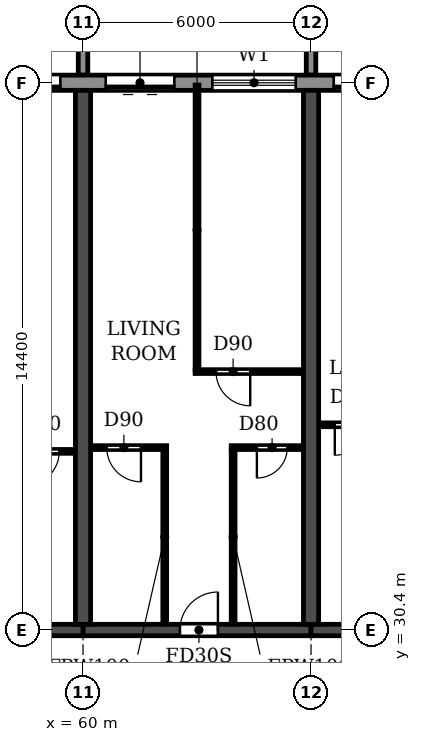
"""IFC4 building model, lengths in metres.
Left out: names, types, materials, properties, quantities, classifications, styles, units other than length and angle.
Written with IfcOpenShell. Run it as: python <this file> out.ifc"""

import sys

from ifc_helpers import new_model, si_unit, direction, frame, frame_2d, origin, place, context, subcontext, project, spatial, polyline, rectangle, outline, extrude, source, transform, mapped, element, fill, save


model = new_model("IFC4")
c1 = context("Model", 3, precision=1e-05, world=origin(), true_north=direction((0.0, 1.0)))
c2 = subcontext(c1, "Body", "Model", "MODEL_VIEW")
j1 = project(units=[si_unit("LENGTHUNIT", "METRE"), si_unit("PLANEANGLEUNIT", "RADIAN")], contexts=[c1])
p1 = place(None, origin())
s1 = spatial("IfcSite", under=j1, at=p1, CompositionType="ELEMENT")
p2 = place(p1, origin())
s2 = spatial("IfcBuilding", under=s1, at=p2, CompositionType="ELEMENT")
p3 = place(p2, frame((0.0, 0.0, 63.0)))
s3 = spatial("IfcBuildingStorey", under=s2, at=p3, CompositionType="ELEMENT", Elevation=63.0)
for number, where, z_axis, x_axis in (
    (1, (60.0, 30.55, 0.0), (0.0, 0.0, 1.0), (0.0, 1.0, 0.0)),
    (2, (66.0, 30.55, 0.0), (0.0, 0.0, 1.0), (0.0, 1.0, 0.0)),
):
    element("IfcWall", number, at=place(p3, frame(where, z_axis=z_axis, x_axis=x_axis)), inside=s3, PredefinedType="SHEAR", context=c2, shape_type="SweptSolid", body=[
        extrude(rectangle(XDim=14.05, YDim=0.4, at=frame_2d((7.025, 0.0))), origin(), (0.0, 0.0, 1.0), 2.95),
    ])
p4 = place(p3, frame((54.0, 30.4, 0.0), z_axis=(0.0, 0.0, 1.0), x_axis=(1.0, 0.0, 0.0)))
e3 = element("IfcWall", 3, at=p4, inside=s3, PredefinedType="SHEAR", context=c2, shape_type="SweptSolid", body=[
    extrude(rectangle(XDim=6.0, YDim=0.3, at=frame_2d((3.0, 0.0))), origin(), (0.0, 0.0, 1.0), 2.35),
])
p5 = place(p4, frame((2.45, 0.0, 0.0)))
e4 = element("IfcOpeningElement", 4, at=p5, cuts=e3, PredefinedType="OPENING", context=c2, shape_type="SweptSolid", body=[
    extrude(rectangle(XDim=1.0, YDim=2.1, at=frame_2d((0.5, 1.05))), frame((0.0, 0.16, 0.0), z_axis=(0.0, -1.0, 0.0), x_axis=(1.0, 0.0, 0.0)), (0.0, 0.0, 1.0), 0.32),
])
p6 = place(p3, frame((60.0, 30.4, 0.0), z_axis=(0.0, 0.0, 1.0), x_axis=(1.0, 0.0, 0.0)))
e5 = element("IfcWall", 5, at=p6, inside=s3, PredefinedType="SHEAR", context=c2, shape_type="SweptSolid", body=[
    extrude(rectangle(XDim=6.0, YDim=0.3, at=frame_2d((3.0, 0.0))), origin(), (0.0, 0.0, 1.0), 2.35),
])
p7 = place(p6, frame((2.55, 0.0, 0.0)))
e6 = element("IfcOpeningElement", 6, at=p7, cuts=e5, PredefinedType="OPENING", context=c2, shape_type="SweptSolid", body=[
    extrude(rectangle(XDim=1.0, YDim=2.1, at=frame_2d((0.5, 1.05))), frame((0.0, 0.16, 0.0), z_axis=(0.0, -1.0, 0.0), x_axis=(1.0, 0.0, 0.0)), (0.0, 0.0, 1.0), 0.32),
])
p8 = place(p3, frame((66.0, 30.4, 0.0), z_axis=(0.0, 0.0, 1.0), x_axis=(1.0, 0.0, 0.0)))
e7 = element("IfcWall", 7, at=p8, inside=s3, PredefinedType="SHEAR", context=c2, shape_type="SweptSolid", body=[
    extrude(rectangle(XDim=6.0, YDim=0.3, at=frame_2d((3.0, 0.0))), origin(), (0.0, 0.0, 1.0), 2.35),
])
p9 = place(p8, frame((2.45, 0.0, 0.0)))
e8 = element("IfcOpeningElement", 8, at=p9, cuts=e7, PredefinedType="OPENING", context=c2, shape_type="SweptSolid", body=[
    extrude(rectangle(XDim=1.0, YDim=2.1, at=frame_2d((0.5, 1.05))), frame((0.0, 0.16, 0.0), z_axis=(0.0, -1.0, 0.0), x_axis=(1.0, 0.0, 0.0)), (0.0, 0.0, 1.0), 0.32),
])
p10 = place(p3, frame((91.317, 44.8, 0.0), z_axis=(0.0, 0.0, 1.0), x_axis=(-1.0, 0.0, 0.0)))
e9 = element("IfcWall", 9, at=p10, inside=s3, PredefinedType="STANDARD", context=c2, shape_type="SweptSolid", body=[
    extrude(rectangle(XDim=80.634, YDim=0.4, at=frame_2d((40.317, 0.0))), origin(), (0.0, 0.0, 1.0), 2.95),
])
p11 = place(p10, frame((76.717, 0.0, 0.9)))
e10 = element("IfcOpeningElement", 10, at=p11, cuts=e9, PredefinedType="OPENING", context=c2, shape_type="SweptSolid", body=[
    extrude(rectangle(XDim=2.2, YDim=1.5, at=frame_2d((1.1, 0.75))), frame((0.0, 0.21, 0.0), z_axis=(0.0, -1.0, 0.0), x_axis=(1.0, 0.0, 0.0)), (0.0, 0.0, 1.0), 0.42),
])
p12 = place(p10, frame((73.917, 0.0, 0.0)))
e11 = element("IfcOpeningElement", 11, at=p12, cuts=e9, PredefinedType="OPENING", context=c2, shape_type="SweptSolid", body=[
    extrude(rectangle(XDim=1.8, YDim=2.4, at=frame_2d((0.9, 1.2))), frame((0.0, 0.21, 0.0), z_axis=(0.0, -1.0, 0.0), x_axis=(1.0, 0.0, 0.0)), (0.0, 0.0, 1.0), 0.42),
])
p13 = place(p10, frame((70.717, 0.0, 0.9)))
e12 = element("IfcOpeningElement", 12, at=p13, cuts=e9, PredefinedType="OPENING", context=c2, shape_type="SweptSolid", body=[
    extrude(rectangle(XDim=2.2, YDim=1.5, at=frame_2d((1.1, 0.75))), frame((0.0, 0.21, 0.0), z_axis=(0.0, -1.0, 0.0), x_axis=(1.0, 0.0, 0.0)), (0.0, 0.0, 1.0), 0.42),
])
p14 = place(p10, frame((67.917, 0.0, 0.0)))
e13 = element("IfcOpeningElement", 13, at=p14, cuts=e9, PredefinedType="OPENING", context=c2, shape_type="SweptSolid", body=[
    extrude(rectangle(XDim=1.8, YDim=2.4, at=frame_2d((0.9, 1.2))), frame((0.0, 0.21, 0.0), z_axis=(0.0, -1.0, 0.0), x_axis=(1.0, 0.0, 0.0)), (0.0, 0.0, 1.0), 0.42),
])
p15 = place(p10, frame((64.717, 0.0, 0.9)))
e14 = element("IfcOpeningElement", 14, at=p15, cuts=e9, PredefinedType="OPENING", context=c2, shape_type="SweptSolid", body=[
    extrude(rectangle(XDim=2.2, YDim=1.5, at=frame_2d((1.1, 0.75))), frame((0.0, 0.21, 0.0), z_axis=(0.0, -1.0, 0.0), x_axis=(1.0, 0.0, 0.0)), (0.0, 0.0, 1.0), 0.42),
])
p16 = place(p10, frame((61.917, 0.0, 0.0)))
e15 = element("IfcOpeningElement", 15, at=p16, cuts=e9, PredefinedType="OPENING", context=c2, shape_type="SweptSolid", body=[
    extrude(rectangle(XDim=1.8, YDim=2.4, at=frame_2d((0.9, 1.2))), frame((0.0, 0.21, 0.0), z_axis=(0.0, -1.0, 0.0), x_axis=(1.0, 0.0, 0.0)), (0.0, 0.0, 1.0), 0.42),
])
p17 = place(p10, frame((58.717, 0.0, 0.9)))
e16 = element("IfcOpeningElement", 16, at=p17, cuts=e9, PredefinedType="OPENING", context=c2, shape_type="SweptSolid", body=[
    extrude(rectangle(XDim=2.2, YDim=1.5, at=frame_2d((1.1, 0.75))), frame((0.0, 0.21, 0.0), z_axis=(0.0, -1.0, 0.0), x_axis=(1.0, 0.0, 0.0)), (0.0, 0.0, 1.0), 0.42),
])
p18 = place(p10, frame((55.717, 0.0, 0.9)))
e17 = element("IfcOpeningElement", 17, at=p18, cuts=e9, PredefinedType="OPENING", context=c2, shape_type="SweptSolid", body=[
    extrude(rectangle(XDim=2.2, YDim=1.5, at=frame_2d((1.1, 0.75))), frame((0.0, 0.21, 0.0), z_axis=(0.0, -1.0, 0.0), x_axis=(1.0, 0.0, 0.0)), (0.0, 0.0, 1.0), 0.42),
])
p19 = place(p10, frame((52.917, 0.0, 0.0)))
e18 = element("IfcOpeningElement", 18, at=p19, cuts=e9, PredefinedType="OPENING", context=c2, shape_type="SweptSolid", body=[
    extrude(rectangle(XDim=1.8, YDim=2.4, at=frame_2d((0.9, 1.2))), frame((0.0, 0.21, 0.0), z_axis=(0.0, -1.0, 0.0), x_axis=(1.0, 0.0, 0.0)), (0.0, 0.0, 1.0), 0.42),
])
p20 = place(p10, frame((49.717, 0.0, 0.9)))
e19 = element("IfcOpeningElement", 19, at=p20, cuts=e9, PredefinedType="OPENING", context=c2, shape_type="SweptSolid", body=[
    extrude(rectangle(XDim=2.2, YDim=1.5, at=frame_2d((1.1, 0.75))), frame((0.0, 0.21, 0.0), z_axis=(0.0, -1.0, 0.0), x_axis=(1.0, 0.0, 0.0)), (0.0, 0.0, 1.0), 0.42),
])
p21 = place(p10, frame((46.917, 0.0, 0.0)))
e20 = element("IfcOpeningElement", 20, at=p21, cuts=e9, PredefinedType="OPENING", context=c2, shape_type="SweptSolid", body=[
    extrude(rectangle(XDim=1.8, YDim=2.4, at=frame_2d((0.9, 1.2))), frame((0.0, 0.21, 0.0), z_axis=(0.0, -1.0, 0.0), x_axis=(1.0, 0.0, 0.0)), (0.0, 0.0, 1.0), 0.42),
])
p22 = place(p10, frame((43.717, 0.0, 0.9)))
e21 = element("IfcOpeningElement", 21, at=p22, cuts=e9, PredefinedType="OPENING", context=c2, shape_type="SweptSolid", body=[
    extrude(rectangle(XDim=2.2, YDim=1.5, at=frame_2d((1.1, 0.75))), frame((0.0, 0.21, 0.0), z_axis=(0.0, -1.0, 0.0), x_axis=(1.0, 0.0, 0.0)), (0.0, 0.0, 1.0), 0.42),
])
p23 = place(p10, frame((40.717, 0.0, 0.9)))
e22 = element("IfcOpeningElement", 22, at=p23, cuts=e9, PredefinedType="OPENING", context=c2, shape_type="SweptSolid", body=[
    extrude(rectangle(XDim=2.2, YDim=1.5, at=frame_2d((1.1, 0.75))), frame((0.0, 0.21, 0.0), z_axis=(0.0, -1.0, 0.0), x_axis=(1.0, 0.0, 0.0)), (0.0, 0.0, 1.0), 0.42),
])
p24 = place(p10, frame((37.717, 0.0, 0.9)))
e23 = element("IfcOpeningElement", 23, at=p24, cuts=e9, PredefinedType="OPENING", context=c2, shape_type="SweptSolid", body=[
    extrude(rectangle(XDim=2.2, YDim=1.5, at=frame_2d((1.1, 0.75))), frame((0.0, 0.21, 0.0), z_axis=(0.0, -1.0, 0.0), x_axis=(1.0, 0.0, 0.0)), (0.0, 0.0, 1.0), 0.42),
])
p25 = place(p10, frame((34.717, 0.0, 0.9)))
e24 = element("IfcOpeningElement", 24, at=p25, cuts=e9, PredefinedType="OPENING", context=c2, shape_type="SweptSolid", body=[
    extrude(rectangle(XDim=2.2, YDim=1.5, at=frame_2d((1.1, 0.75))), frame((0.0, 0.21, 0.0), z_axis=(0.0, -1.0, 0.0), x_axis=(1.0, 0.0, 0.0)), (0.0, 0.0, 1.0), 0.42),
])
p26 = place(p10, frame((31.917, 0.0, 0.0)))
e25 = element("IfcOpeningElement", 25, at=p26, cuts=e9, PredefinedType="OPENING", context=c2, shape_type="SweptSolid", body=[
    extrude(rectangle(XDim=1.8, YDim=2.4, at=frame_2d((0.9, 1.2))), frame((0.0, 0.21, 0.0), z_axis=(0.0, -1.0, 0.0), x_axis=(1.0, 0.0, 0.0)), (0.0, 0.0, 1.0), 0.42),
])
p27 = place(p10, frame((28.917, 0.0, 0.0)))
e26 = element("IfcOpeningElement", 26, at=p27, cuts=e9, PredefinedType="OPENING", context=c2, shape_type="SweptSolid", body=[
    extrude(rectangle(XDim=1.8, YDim=2.4, at=frame_2d((0.9, 1.2))), frame((0.0, 0.21, 0.0), z_axis=(0.0, -1.0, 0.0), x_axis=(1.0, 0.0, 0.0)), (0.0, 0.0, 1.0), 0.42),
])
p28 = place(p10, frame((25.717, 0.0, 0.9)))
e27 = element("IfcOpeningElement", 27, at=p28, cuts=e9, PredefinedType="OPENING", context=c2, shape_type="SweptSolid", body=[
    extrude(rectangle(XDim=2.2, YDim=1.5, at=frame_2d((1.1, 0.75))), frame((0.0, 0.21, 0.0), z_axis=(0.0, -1.0, 0.0), x_axis=(1.0, 0.0, 0.0)), (0.0, 0.0, 1.0), 0.42),
])
p29 = place(p10, frame((22.917, 0.0, 0.0)))
e28 = element("IfcOpeningElement", 28, at=p29, cuts=e9, PredefinedType="OPENING", context=c2, shape_type="SweptSolid", body=[
    extrude(rectangle(XDim=1.8, YDim=2.4, at=frame_2d((0.9, 1.2))), frame((0.0, 0.21, 0.0), z_axis=(0.0, -1.0, 0.0), x_axis=(1.0, 0.0, 0.0)), (0.0, 0.0, 1.0), 0.42),
])
p30 = place(p10, frame((19.717, 0.0, 0.9)))
e29 = element("IfcOpeningElement", 29, at=p30, cuts=e9, PredefinedType="OPENING", context=c2, shape_type="SweptSolid", body=[
    extrude(rectangle(XDim=2.2, YDim=1.5, at=frame_2d((1.1, 0.75))), frame((0.0, 0.21, 0.0), z_axis=(0.0, -1.0, 0.0), x_axis=(1.0, 0.0, 0.0)), (0.0, 0.0, 1.0), 0.42),
])
p31 = place(p10, frame((16.917, 0.0, 0.0)))
e30 = element("IfcOpeningElement", 30, at=p31, cuts=e9, PredefinedType="OPENING", context=c2, shape_type="SweptSolid", body=[
    extrude(rectangle(XDim=1.8, YDim=2.4, at=frame_2d((0.9, 1.2))), frame((0.0, 0.21, 0.0), z_axis=(0.0, -1.0, 0.0), x_axis=(1.0, 0.0, 0.0)), (0.0, 0.0, 1.0), 0.42),
])
p32 = place(p10, frame((13.717, 0.0, 0.9)))
e31 = element("IfcOpeningElement", 31, at=p32, cuts=e9, PredefinedType="OPENING", context=c2, shape_type="SweptSolid", body=[
    extrude(rectangle(XDim=2.2, YDim=1.5, at=frame_2d((1.1, 0.75))), frame((0.0, 0.21, 0.0), z_axis=(0.0, -1.0, 0.0), x_axis=(1.0, 0.0, 0.0)), (0.0, 0.0, 1.0), 0.42),
])
p33 = place(p10, frame((10.917, 0.0, 0.0)))
e32 = element("IfcOpeningElement", 32, at=p33, cuts=e9, PredefinedType="OPENING", context=c2, shape_type="SweptSolid", body=[
    extrude(rectangle(XDim=1.8, YDim=2.4, at=frame_2d((0.9, 1.2))), frame((0.0, 0.21, 0.0), z_axis=(0.0, -1.0, 0.0), x_axis=(1.0, 0.0, 0.0)), (0.0, 0.0, 1.0), 0.42),
])
p34 = place(p10, frame((7.717, 0.0, 0.9)))
e33 = element("IfcOpeningElement", 33, at=p34, cuts=e9, PredefinedType="OPENING", context=c2, shape_type="SweptSolid", body=[
    extrude(rectangle(XDim=2.2, YDim=1.5, at=frame_2d((1.1, 0.75))), frame((0.0, 0.21, 0.0), z_axis=(0.0, -1.0, 0.0), x_axis=(1.0, 0.0, 0.0)), (0.0, 0.0, 1.0), 0.42),
])
p35 = place(p10, frame((4.717, 0.0, 0.9)))
e34 = element("IfcOpeningElement", 34, at=p35, cuts=e9, PredefinedType="OPENING", context=c2, shape_type="SweptSolid", body=[
    extrude(rectangle(XDim=2.2, YDim=1.5, at=frame_2d((1.1, 0.75))), frame((0.0, 0.21, 0.0), z_axis=(0.0, -1.0, 0.0), x_axis=(1.0, 0.0, 0.0)), (0.0, 0.0, 1.0), 0.42),
])
p36 = place(p10, frame((1.717, 0.0, 0.9)))
e35 = element("IfcOpeningElement", 35, at=p36, cuts=e9, PredefinedType="OPENING", context=c2, shape_type="SweptSolid", body=[
    extrude(rectangle(XDim=2.2, YDim=1.5, at=frame_2d((1.1, 0.75))), frame((0.0, 0.21, 0.0), z_axis=(0.0, -1.0, 0.0), x_axis=(1.0, 0.0, 0.0)), (0.0, 0.0, 1.0), 0.42),
])
m1 = source(origin(), c2, "Body", "SweptSolid", [
    extrude(outline(polyline([(0.0, 0.0), (0.25, 0.0), (0.25, 3.1), (0.0, 3.1), (0.0, 0.0)])), origin(), (0.0, 0.0, 1.0), 3.1),
])
for number, where in (
    (36, (59.875, 45.0, 0.0)),
    (37, (65.875, 45.0, 0.0)),
):
    element("IfcWall", number, at=place(p3, frame(where)), inside=s3, PredefinedType="STANDARD", context=c2, shape_type="MappedRepresentation", body=[
        mapped(m1, transform((0.0, 0.0, 0.0))),
    ])
p37 = place(p3, frame((57.8, 35.1, 0.0), z_axis=(0.0, 0.0, 1.0), x_axis=(1.0, 0.0, 0.0)))
e38 = element("IfcWall", 38, at=p37, inside=s3, PredefinedType="PARTITIONING", context=c2, shape_type="SweptSolid", body=[
    extrude(rectangle(XDim=1.99, YDim=0.1, at=frame_2d((0.995, 0.0))), origin(), (0.0, 0.0, 1.0), 2.95),
])
p38 = place(p37, frame((0.675, 0.0, 0.0)))
e39 = element("IfcOpeningElement", 39, at=p38, cuts=e38, PredefinedType="OPENING", context=c2, shape_type="SweptSolid", body=[
    extrude(rectangle(XDim=0.9, YDim=2.1, at=frame_2d((0.45, 1.05))), frame((0.0, 0.06, 0.0), z_axis=(0.0, -1.0, 0.0), x_axis=(1.0, 0.0, 0.0)), (0.0, 0.0, 1.0), 0.12),
])
p39 = place(p3, frame((60.21, 35.2, 0.0), z_axis=(0.0, 0.0, 1.0), x_axis=(1.0, 0.0, 0.0)))
e40 = element("IfcWall", 40, at=p39, inside=s3, PredefinedType="PARTITIONING", context=c2, shape_type="SweptSolid", body=[
    extrude(rectangle(XDim=1.99, YDim=0.1, at=frame_2d((0.995, 0.0))), origin(), (0.0, 0.0, 1.0), 2.95),
])
p40 = place(p39, frame((0.415, 0.0, 0.0)))
e41 = element("IfcOpeningElement", 41, at=p40, cuts=e40, PredefinedType="OPENING", context=c2, shape_type="SweptSolid", body=[
    extrude(rectangle(XDim=0.9, YDim=2.1, at=frame_2d((0.45, 1.05))), frame((0.0, 0.06, 0.0), z_axis=(0.0, -1.0, 0.0), x_axis=(1.0, 0.0, 0.0)), (0.0, 0.0, 1.0), 0.12),
])
p41 = place(p3, frame((63.9, 35.2, 0.0), z_axis=(0.0, 0.0, 1.0), x_axis=(1.0, 0.0, 0.0)))
e42 = element("IfcWall", 42, at=p41, inside=s3, PredefinedType="PARTITIONING", context=c2, shape_type="SweptSolid", body=[
    extrude(rectangle(XDim=1.89, YDim=0.1, at=frame_2d((0.945, 0.0))), origin(), (0.0, 0.0, 1.0), 2.95),
])
p42 = place(p41, frame((0.675, 0.0, 0.0)))
e43 = element("IfcOpeningElement", 43, at=p42, cuts=e42, PredefinedType="OPENING", context=c2, shape_type="SweptSolid", body=[
    extrude(rectangle(XDim=0.8, YDim=2.1, at=frame_2d((0.4, 1.05))), frame((0.0, 0.06, 0.0), z_axis=(0.0, -1.0, 0.0), x_axis=(1.0, 0.0, 0.0)), (0.0, 0.0, 1.0), 0.12),
])
p43 = place(p3, frame((66.21, 35.8, 0.0), z_axis=(0.0, 0.0, 1.0), x_axis=(1.0, 0.0, 0.0)))
e44 = element("IfcWall", 44, at=p43, inside=s3, PredefinedType="PARTITIONING", context=c2, shape_type="SweptSolid", body=[
    extrude(rectangle(XDim=1.89, YDim=0.1, at=frame_2d((0.945, 0.0))), origin(), (0.0, 0.0, 1.0), 2.95),
])
p44 = place(p43, frame((0.415, 0.0, 0.0)))
e45 = element("IfcOpeningElement", 45, at=p44, cuts=e44, PredefinedType="OPENING", context=c2, shape_type="SweptSolid", body=[
    extrude(rectangle(XDim=0.8, YDim=2.1, at=frame_2d((0.4, 1.05))), frame((0.0, 0.06, 0.0), z_axis=(0.0, -1.0, 0.0), x_axis=(1.0, 0.0, 0.0)), (0.0, 0.0, 1.0), 0.12),
])
p45 = place(p3, frame((62.95, 37.2, 0.0), z_axis=(0.0, 0.0, 1.0), x_axis=(1.0, 0.0, 0.0)))
e46 = element("IfcWall", 46, at=p45, inside=s3, PredefinedType="PARTITIONING", context=c2, shape_type="SweptSolid", body=[
    extrude(rectangle(XDim=2.84, YDim=0.1, at=frame_2d((1.42, 0.0))), origin(), (0.0, 0.0, 1.0), 2.95),
])
p46 = place(p45, frame((0.55, 0.0, 0.0)))
e47 = element("IfcOpeningElement", 47, at=p46, cuts=e46, PredefinedType="OPENING", context=c2, shape_type="SweptSolid", body=[
    extrude(rectangle(XDim=0.9, YDim=2.1, at=frame_2d((0.45, 1.05))), frame((0.0, 0.06, 0.0), z_axis=(0.0, -1.0, 0.0), x_axis=(1.0, 0.0, 0.0)), (0.0, 0.0, 1.0), 0.12),
])
p47 = place(p3, frame((62.15, 30.56, 0.0), z_axis=(0.0, 0.0, 1.0), x_axis=(0.0, 1.0, 0.0)))
e48 = element("IfcWall", 48, at=p47, inside=s3, PredefinedType="PARTITIONING", context=c2, shape_type="SweptSolid", body=[
    extrude(rectangle(XDim=4.59, YDim=0.1, at=frame_2d((2.295, 0.0))), origin(), (0.0, 0.0, 1.0), 2.95),
])
p48 = place(p3, frame((63.0, 37.25, 0.0), z_axis=(0.0, 0.0, 1.0), x_axis=(0.0, 1.0, 0.0)))
e49 = element("IfcWall", 49, at=p48, inside=s3, PredefinedType="PARTITIONING", context=c2, shape_type="SweptSolid", body=[
    extrude(rectangle(XDim=7.49, YDim=0.1, at=frame_2d((3.745, 0.0))), origin(), (0.0, 0.0, 1.0), 2.95),
])
p49 = place(p3, frame((63.95, 30.56, 0.0), z_axis=(0.0, 0.0, 1.0), x_axis=(0.0, 1.0, 0.0)))
e50 = element("IfcWall", 50, at=p49, inside=s3, PredefinedType="PARTITIONING", context=c2, shape_type="SweptSolid", body=[
    extrude(rectangle(XDim=4.59, YDim=0.1, at=frame_2d((2.295, 0.0))), origin(), (0.0, 0.0, 1.0), 2.95),
])
p50 = place(p26, origin())
e51 = element("IfcDoor", 51, at=p50, inside=s3, OperationType="DOUBLE_DOOR_SLIDING", PredefinedType="DOOR", context=c2, shape_type="SweptSolid", body=[
    extrude(rectangle(XDim=1.8, YDim=2.4, at=frame_2d((0.9, 1.2))), frame((0.0, 0.025, 0.0), z_axis=(0.0, -1.0, 0.0), x_axis=(1.0, 0.0, 0.0)), (0.0, 0.0, 1.0), 0.05),
])
fill(e25, e51)
p51 = place(p27, origin())
e52 = element("IfcDoor", 52, at=p51, inside=s3, OperationType="DOUBLE_DOOR_SLIDING", PredefinedType="DOOR", context=c2, shape_type="SweptSolid", body=[
    extrude(rectangle(XDim=1.8, YDim=2.4, at=frame_2d((0.9, 1.2))), frame((0.0, 0.025, 0.0), z_axis=(0.0, -1.0, 0.0), x_axis=(1.0, 0.0, 0.0)), (0.0, 0.0, 1.0), 0.05),
])
fill(e26, e52)
p52 = place(p28, origin())
e53 = element("IfcWindow", 53, at=p52, inside=s3, PartitioningType="DOUBLE_PANEL_HORIZONTAL", PredefinedType="WINDOW", context=c2, shape_type="SweptSolid", body=[
    extrude(rectangle(XDim=2.2, YDim=1.5, at=frame_2d((1.1, 0.75))), frame((0.0, 0.03, 0.0), z_axis=(0.0, -1.0, 0.0), x_axis=(1.0, 0.0, 0.0)), (0.0, 0.0, 1.0), 0.06),
])
fill(e27, e53)
p53 = place(p29, origin())
e54 = element("IfcDoor", 54, at=p53, inside=s3, OperationType="DOUBLE_DOOR_SLIDING", PredefinedType="DOOR", context=c2, shape_type="SweptSolid", body=[
    extrude(rectangle(XDim=1.8, YDim=2.4, at=frame_2d((0.9, 1.2))), frame((0.0, 0.025, 0.0), z_axis=(0.0, -1.0, 0.0), x_axis=(1.0, 0.0, 0.0)), (0.0, 0.0, 1.0), 0.05),
])
fill(e28, e54)
p54 = place(p38, frame((0.9, 0.0, 0.0), z_axis=(0.0, 0.0, 1.0), x_axis=(-1.0, 0.0, 0.0)))
e55 = element("IfcDoor", 55, at=p54, inside=s3, OperationType="SINGLE_SWING_RIGHT", PredefinedType="DOOR", context=c2, shape_type="SweptSolid", body=[
    extrude(rectangle(XDim=0.9, YDim=2.1, at=frame_2d((0.45, 1.05))), frame((0.0, 0.025, 0.0), z_axis=(0.0, -1.0, 0.0), x_axis=(1.0, 0.0, 0.0)), (0.0, 0.0, 1.0), 0.05),
])
fill(e39, e55)
p55 = place(p40, frame((0.9, 0.0, 0.0), z_axis=(0.0, 0.0, 1.0), x_axis=(-1.0, 0.0, 0.0)))
e56 = element("IfcDoor", 56, at=p55, inside=s3, OperationType="SINGLE_SWING_LEFT", PredefinedType="DOOR", context=c2, shape_type="SweptSolid", body=[
    extrude(rectangle(XDim=0.9, YDim=2.1, at=frame_2d((0.45, 1.05))), frame((0.0, 0.025, 0.0), z_axis=(0.0, -1.0, 0.0), x_axis=(1.0, 0.0, 0.0)), (0.0, 0.0, 1.0), 0.05),
])
fill(e41, e56)
p56 = place(p7, origin())
e57 = element("IfcDoor", 57, at=p56, inside=s3, OperationType="SINGLE_SWING_RIGHT", PredefinedType="DOOR", context=c2, shape_type="SweptSolid", body=[
    extrude(rectangle(XDim=1.0, YDim=2.1, at=frame_2d((0.5, 1.05))), frame((0.0, 0.025, 0.0), z_axis=(0.0, -1.0, 0.0), x_axis=(1.0, 0.0, 0.0)), (0.0, 0.0, 1.0), 0.05),
])
fill(e6, e57)
p57 = place(p46, frame((0.9, 0.0, 0.0), z_axis=(0.0, 0.0, 1.0), x_axis=(-1.0, 0.0, 0.0)))
e58 = element("IfcDoor", 58, at=p57, inside=s3, OperationType="SINGLE_SWING_LEFT", PredefinedType="DOOR", context=c2, shape_type="SweptSolid", body=[
    extrude(rectangle(XDim=0.9, YDim=2.1, at=frame_2d((0.45, 1.05))), frame((0.0, 0.025, 0.0), z_axis=(0.0, -1.0, 0.0), x_axis=(1.0, 0.0, 0.0)), (0.0, 0.0, 1.0), 0.05),
])
fill(e47, e58)
p58 = place(p42, frame((0.8, 0.0, 0.0), z_axis=(0.0, 0.0, 1.0), x_axis=(-1.0, 0.0, 0.0)))
e59 = element("IfcDoor", 59, at=p58, inside=s3, OperationType="SINGLE_SWING_RIGHT", PredefinedType="DOOR", context=c2, shape_type="SweptSolid", body=[
    extrude(rectangle(XDim=0.8, YDim=2.1, at=frame_2d((0.4, 1.05))), frame((0.0, 0.025, 0.0), z_axis=(0.0, -1.0, 0.0), x_axis=(1.0, 0.0, 0.0)), (0.0, 0.0, 1.0), 0.05),
])
fill(e43, e59)
p59 = place(p44, frame((0.8, 0.0, 0.0), z_axis=(0.0, 0.0, 1.0), x_axis=(-1.0, 0.0, 0.0)))
e60 = element("IfcDoor", 60, at=p59, inside=s3, OperationType="SINGLE_SWING_RIGHT", PredefinedType="DOOR", context=c2, shape_type="SweptSolid", body=[
    extrude(rectangle(XDim=0.8, YDim=2.1, at=frame_2d((0.4, 1.05))), frame((0.0, 0.025, 0.0), z_axis=(0.0, -1.0, 0.0), x_axis=(1.0, 0.0, 0.0)), (0.0, 0.0, 1.0), 0.05),
])
fill(e45, e60)
save(model, sys.argv[1])
